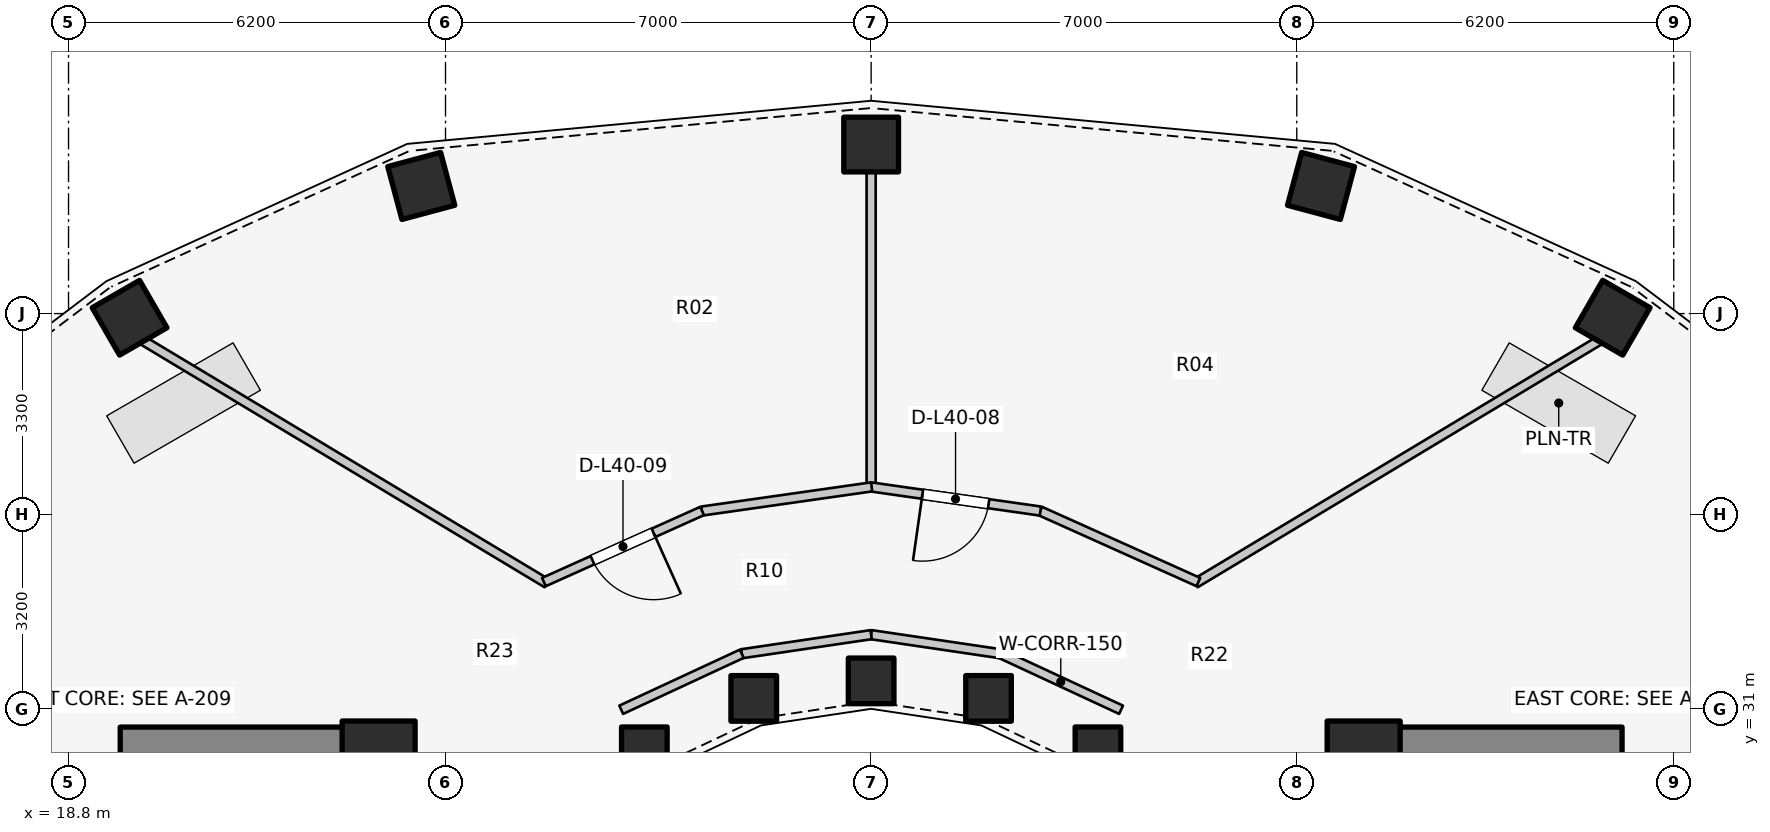
"""IFC4 building model, lengths in metres.
Left out: names, types, materials, properties, quantities, classifications, styles, units other than length and angle.
Written with IfcOpenShell. Run it as: python <this file> out.ifc"""

import sys

from ifc_helpers import new_model, si_unit, direction, frame, frame_2d, origin, origin_2d, place, context, subcontext, project, spatial, rectangle, extrude, element, fill, save


model = new_model("IFC4")
c1 = context("Model", 3, precision=1e-05, world=origin(), true_north=direction((0.0, 1.0)))
c2 = subcontext(c1, "Body", "Model", "MODEL_VIEW")
j1 = project(units=[si_unit("LENGTHUNIT", "METRE"), si_unit("PLANEANGLEUNIT", "RADIAN")], contexts=[c1])
p1 = place(None, origin())
s1 = spatial("IfcSite", under=j1, at=p1, CompositionType="ELEMENT")
p2 = place(p1, origin())
s2 = spatial("IfcBuilding", under=s1, at=p2, CompositionType="ELEMENT")
p3 = place(p2, frame((0.0, 0.0, 133.2)))
s3 = spatial("IfcBuildingStorey", under=s2, at=p3, CompositionType="ELEMENT", Elevation=133.2)
for number, where, z_axis, x_axis in (
    (1, (19.65, 30.35, 0.0), (0.0, 0.0, 1.0), (1.0, 0.0, 0.0)),
    (2, (39.85, 30.35, 0.0), (0.0, 0.0, 1.0), (1.0, 0.0, 0.0)),
):
    element("IfcWall", number, at=place(p3, frame(where, z_axis=z_axis, x_axis=x_axis)), inside=s3, PredefinedType="SHEAR", context=c2, shape_type="SweptSolid", body=[
        extrude(rectangle(XDim=4.5, YDim=0.7, at=frame_2d((2.25, 0.0))), origin(), (0.0, 0.0, 1.0), 4.2),
    ])
for number, where, z_axis, x_axis in (
    (3, (23.9, 30.2, 0.0), (0.0, 0.0, 1.0), (1.0, 0.0, 0.0)),
    (4, (40.1, 30.2, 0.0), (0.0, 0.0, 1.0), (1.0, 0.0, 0.0)),
):
    element("IfcColumn", number, at=place(p3, frame(where, z_axis=z_axis, x_axis=x_axis)), inside=s3, PredefinedType="COLUMN", context=c2, shape_type="SweptSolid", body=[
        extrude(rectangle(XDim=1.2, YDim=1.2, at=origin_2d()), origin(), (0.0, 0.0, 1.0), 4.2),
    ])
p4 = place(p3, frame((35.73, 30.327, 0.0), z_axis=(0.0, 0.0, 1.0), x_axis=(1.0, 0.0, 0.0)))
e5 = element("IfcColumn", 5, at=p4, inside=s3, PredefinedType="COLUMN", context=c2, shape_type="SweptSolid", body=[
    extrude(rectangle(XDim=0.75, YDim=0.75, at=origin_2d()), origin(), (0.0, 0.0, 1.0), 4.2),
])
p5 = place(p3, frame((44.196, 37.432, 0.0), z_axis=(0.0, 0.0, 1.0), x_axis=(0.5, 0.866025403784, 0.0)))
e6 = element("IfcColumn", 6, at=p5, inside=s3, PredefinedType="COLUMN", context=c2, shape_type="SweptSolid", body=[
    extrude(rectangle(XDim=0.9, YDim=0.9, at=origin_2d()), origin(), (0.0, 0.0, 1.0), 4.2),
])
p6 = place(p3, frame((33.931, 31.172, 0.0), z_axis=(0.0, 0.0, 1.0), x_axis=(1.0, 0.0, 0.0)))
e7 = element("IfcColumn", 7, at=p6, inside=s3, PredefinedType="COLUMN", context=c2, shape_type="SweptSolid", body=[
    extrude(rectangle(XDim=0.75, YDim=0.75, at=origin_2d()), origin(), (0.0, 0.0, 1.0), 4.2),
])
p7 = place(p3, frame((39.399, 39.599, 0.0), z_axis=(0.0, 0.0, 1.0), x_axis=(0.258819045103, 0.965925826289, 0.0)))
e8 = element("IfcColumn", 8, at=p7, inside=s3, PredefinedType="COLUMN", context=c2, shape_type="SweptSolid", body=[
    extrude(rectangle(XDim=0.9, YDim=0.9, at=origin_2d()), origin(), (0.0, 0.0, 1.0), 4.2),
])
p8 = place(p3, frame((32.0, 31.46, 0.0), z_axis=(0.0, 0.0, 1.0), x_axis=(1.0, 0.0, 0.0)))
e9 = element("IfcColumn", 9, at=p8, inside=s3, PredefinedType="COLUMN", context=c2, shape_type="SweptSolid", body=[
    extrude(rectangle(XDim=0.75, YDim=0.75, at=origin_2d()), origin(), (0.0, 0.0, 1.0), 4.2),
])
p9 = place(p3, frame((32.0, 40.28, 0.0), z_axis=(0.0, 0.0, 1.0), x_axis=(0.0, 1.0, 0.0)))
e10 = element("IfcColumn", 10, at=p9, inside=s3, PredefinedType="COLUMN", context=c2, shape_type="SweptSolid", body=[
    extrude(rectangle(XDim=0.9, YDim=0.9, at=origin_2d()), origin(), (0.0, 0.0, 1.0), 4.2),
])
p10 = place(p3, frame((30.069, 31.172, 0.0), z_axis=(0.0, 0.0, 1.0), x_axis=(1.0, 0.0, 0.0)))
e11 = element("IfcColumn", 11, at=p10, inside=s3, PredefinedType="COLUMN", context=c2, shape_type="SweptSolid", body=[
    extrude(rectangle(XDim=0.75, YDim=0.75, at=origin_2d()), origin(), (0.0, 0.0, 1.0), 4.2),
])
p11 = place(p3, frame((24.601, 39.599, 0.0), z_axis=(0.0, 0.0, 1.0), x_axis=(-0.258819045103, 0.965925826289, 0.0)))
e12 = element("IfcColumn", 12, at=p11, inside=s3, PredefinedType="COLUMN", context=c2, shape_type="SweptSolid", body=[
    extrude(rectangle(XDim=0.9, YDim=0.9, at=origin_2d()), origin(), (0.0, 0.0, 1.0), 4.2),
])
p12 = place(p3, frame((28.27, 30.327, 0.0), z_axis=(0.0, 0.0, 1.0), x_axis=(1.0, 0.0, 0.0)))
e13 = element("IfcColumn", 13, at=p12, inside=s3, PredefinedType="COLUMN", context=c2, shape_type="SweptSolid", body=[
    extrude(rectangle(XDim=0.75, YDim=0.75, at=origin_2d()), origin(), (0.0, 0.0, 1.0), 4.2),
])
p13 = place(p3, frame((19.804, 37.432, 0.0), z_axis=(0.0, 0.0, 1.0), x_axis=(-0.5, 0.866025403784, 0.0)))
e14 = element("IfcColumn", 14, at=p13, inside=s3, PredefinedType="COLUMN", context=c2, shape_type="SweptSolid", body=[
    extrude(rectangle(XDim=0.9, YDim=0.9, at=origin_2d()), origin(), (0.0, 0.0, 1.0), 4.2),
])
p14 = place(p3, frame((36.11, 30.985, 0.0), z_axis=(0.0, 0.0, 1.0), x_axis=(-0.906943449489, 0.421252393975, 0.0)))
e15 = element("IfcWall", 15, at=p14, inside=s3, PredefinedType="PARTITIONING", context=c2, shape_type="SweptSolid", body=[
    extrude(rectangle(XDim=2.186, YDim=0.15, at=frame_2d((1.093, 0.0))), origin(), (0.0, 0.0, 1.0), 2.32),
])
for number, where, z_axis, x_axis in (
    (16, (34.127, 31.906, 0.0), (0.0, 0.0, 1.0), (-0.989, 0.146, 0.0)),
    (17, (32.0, 32.22, 0.0), (0.0, 0.0, 1.0), (-0.989, -0.146, 0.0)),
):
    element("IfcWall", number, at=place(p3, frame(where, z_axis=z_axis, x_axis=x_axis)), inside=s3, PredefinedType="PARTITIONING", context=c2, shape_type="SweptSolid", body=[
        extrude(rectangle(XDim=2.151, YDim=0.15, at=frame_2d((1.075, 0.0))), origin(), (0.0, 0.0, 1.0), 2.32),
    ])
p15 = place(p3, frame((29.873, 31.906, 0.0), z_axis=(0.0, 0.0, 1.0), x_axis=(-0.906943449489, -0.421252393975, 0.0)))
e18 = element("IfcWall", 18, at=p15, inside=s3, PredefinedType="PARTITIONING", context=c2, shape_type="SweptSolid", body=[
    extrude(rectangle(XDim=2.186, YDim=0.15, at=frame_2d((1.093, 0.0))), origin(), (0.0, 0.0, 1.0), 2.32),
])
p16 = place(p3, frame((37.332, 33.063, 0.0), z_axis=(0.0, 0.0, 1.0), x_axis=(0.857109469509, 0.515134309941, 0.0)))
e19 = element("IfcWall", 19, at=p16, inside=s3, PredefinedType="PARTITIONING", context=c2, shape_type="SweptSolid", body=[
    extrude(rectangle(XDim=7.757, YDim=0.15, at=frame_2d((3.879, 0.0))), origin(), (0.0, 0.0, 1.0), 2.32),
])
p17 = place(p3, frame((32.0, 34.6, 0.0), z_axis=(0.0, 0.0, 1.0), x_axis=(0.0, 1.0, 0.0)))
e20 = element("IfcWall", 20, at=p17, inside=s3, PredefinedType="PARTITIONING", context=c2, shape_type="SweptSolid", body=[
    extrude(rectangle(XDim=5.25, YDim=0.15, at=frame_2d((2.625, 0.0))), origin(), (0.0, 0.0, 1.0), 2.32),
])
p18 = place(p3, frame((37.382, 33.085, 0.0), z_axis=(0.0, 0.0, 1.0), x_axis=(-0.9121872495, 0.409773622687, 0.0)))
e21 = element("IfcWall", 21, at=p18, inside=s3, PredefinedType="PARTITIONING", context=c2, shape_type="SweptSolid", body=[
    extrude(rectangle(XDim=2.852, YDim=0.15, at=frame_2d((1.426, 0.0))), origin(), (0.0, 0.0, 1.0), 2.32),
])
p19 = place(p3, frame((34.784, 34.252, 0.0), z_axis=(0.0, 0.0, 1.0), x_axis=(-0.990016911465, 0.140948625436, 0.0)))
e22 = element("IfcWall", 22, at=p19, inside=s3, PredefinedType="PARTITIONING", context=c2, shape_type="SweptSolid", body=[
    extrude(rectangle(XDim=2.82, YDim=0.15, at=frame_2d((1.41, 0.0))), origin(), (0.0, 0.0, 1.0), 2.32),
])
p20 = place(p19, frame((0.86, 0.0, 0.0)))
e23 = element("IfcOpeningElement", 23, at=p20, cuts=e22, PredefinedType="OPENING", context=c2, shape_type="SweptSolid", body=[
    extrude(rectangle(XDim=1.1, YDim=2.1, at=frame_2d((0.55, 1.05))), frame((0.0, 0.085, 0.0), z_axis=(0.0, -1.0, 0.0), x_axis=(1.0, 0.0, 0.0)), (0.0, 0.0, 1.0), 0.17),
])
p21 = place(p3, frame((26.668, 33.063, 0.0), z_axis=(0.0, 0.0, 1.0), x_axis=(-0.857109469509, 0.515134309941, 0.0)))
e24 = element("IfcWall", 24, at=p21, inside=s3, PredefinedType="PARTITIONING", context=c2, shape_type="SweptSolid", body=[
    extrude(rectangle(XDim=7.757, YDim=0.15, at=frame_2d((3.879, 0.0))), origin(), (0.0, 0.0, 1.0), 2.32),
])
p22 = place(p3, frame((32.008, 34.65, 0.0), z_axis=(0.0, 0.0, 1.0), x_axis=(-0.990016911465, -0.140948625436, 0.0)))
e25 = element("IfcWall", 25, at=p22, inside=s3, PredefinedType="PARTITIONING", context=c2, shape_type="SweptSolid", body=[
    extrude(rectangle(XDim=2.82, YDim=0.15, at=frame_2d((1.41, 0.0))), origin(), (0.0, 0.0, 1.0), 2.32),
])
p23 = place(p3, frame((29.219, 34.254, 0.0), z_axis=(0.0, 0.0, 1.0), x_axis=(-0.9121872495, -0.409773622687, 0.0)))
e26 = element("IfcWall", 26, at=p23, inside=s3, PredefinedType="PARTITIONING", context=c2, shape_type="SweptSolid", body=[
    extrude(rectangle(XDim=2.852, YDim=0.15, at=frame_2d((1.426, 0.0))), origin(), (0.0, 0.0, 1.0), 2.32),
])
p24 = place(p23, frame((0.876, 0.0, 0.0)))
e27 = element("IfcOpeningElement", 27, at=p24, cuts=e26, PredefinedType="OPENING", context=c2, shape_type="SweptSolid", body=[
    extrude(rectangle(XDim=1.1, YDim=2.1, at=frame_2d((0.55, 1.05))), frame((0.0, 0.085, 0.0), z_axis=(0.0, -1.0, 0.0), x_axis=(1.0, 0.0, 0.0)), (0.0, 0.0, 1.0), 0.17),
])
p25 = place(p20, origin())
e28 = element("IfcDoor", 28, at=p25, inside=s3, OperationType="SINGLE_SWING_RIGHT", PredefinedType="DOOR", context=c2, shape_type="SweptSolid", body=[
    extrude(rectangle(XDim=1.1, YDim=2.1, at=frame_2d((0.55, 1.05))), frame((0.0, 0.025, 0.0), z_axis=(0.0, -1.0, 0.0), x_axis=(1.0, 0.0, 0.0)), (0.0, 0.0, 1.0), 0.05),
])
fill(e23, e28)
p26 = place(p24, origin())
e29 = element("IfcDoor", 29, at=p26, inside=s3, OperationType="SINGLE_SWING_LEFT", PredefinedType="DOOR", context=c2, shape_type="SweptSolid", body=[
    extrude(rectangle(XDim=1.1, YDim=2.1, at=frame_2d((0.55, 1.05))), frame((0.0, 0.025, 0.0), z_axis=(0.0, -1.0, 0.0), x_axis=(1.0, 0.0, 0.0)), (0.0, 0.0, 1.0), 0.05),
])
fill(e27, e29)
save(model, sys.argv[1])
